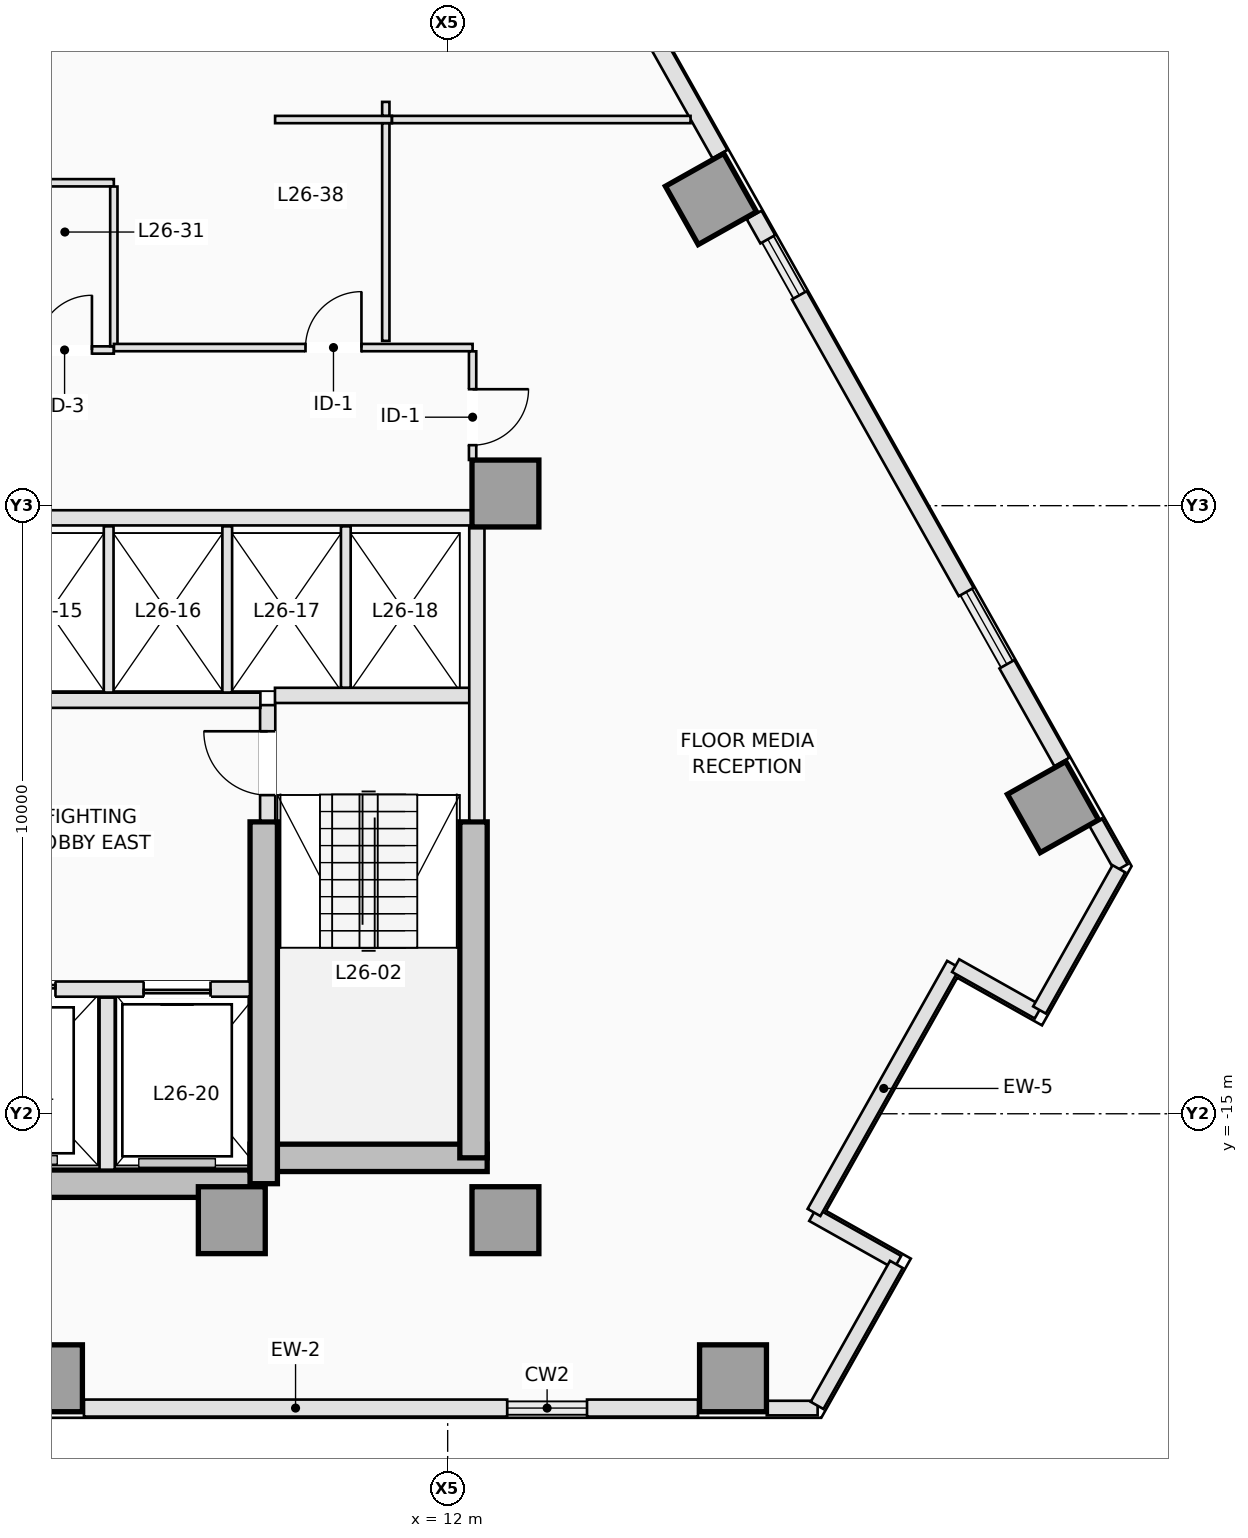
"""IFC4 building model, lengths in metres.
Left out: names, types, materials, properties, quantities, classifications, styles, units other than length and angle.
Written with IfcOpenShell. Run it as: python <this file> out.ifc"""

import sys

from ifc_helpers import new_model, si_unit, direction, frame, frame_2d, origin, origin_2d, place, context, subcontext, project, spatial, rectangle, extrude, element, fill, save


model = new_model("IFC4")
c1 = context("Model", 3, precision=1e-05, world=origin(), true_north=direction((0.0, 1.0)))
c2 = subcontext(c1, "Body", "Model", "MODEL_VIEW")
j1 = project(units=[si_unit("LENGTHUNIT", "METRE"), si_unit("PLANEANGLEUNIT", "RADIAN")], contexts=[c1])
p1 = place(None, origin())
s1 = spatial("IfcSite", under=j1, at=p1, CompositionType="ELEMENT")
p2 = place(p1, origin())
s2 = spatial("IfcBuilding", under=s1, at=p2, CompositionType="ELEMENT")
p3 = place(p2, frame((0.0, 0.0, 98.5)))
s3 = spatial("IfcBuildingStorey", under=s2, at=p3, CompositionType="ELEMENT", Elevation=98.5)
p4 = place(p3, frame((3.75, -16.15, 0.0), z_axis=(0.0, 0.0, 1.0), x_axis=(1.0, 0.0, 0.0)))
e1 = element("IfcWall", 1, at=p4, inside=s3, PredefinedType="SHEAR", context=c2, shape_type="SweptSolid", body=[
    extrude(rectangle(XDim=5.225, YDim=0.45, at=frame_2d((2.613, 0.0))), origin(), (0.0, 0.0, 1.0), 3.5),
])
p5 = place(p3, frame((8.75, -15.725, 0.0), z_axis=(0.0, 0.0, 1.0), x_axis=(1.0, 0.0, 0.0)))
e2 = element("IfcWall", 2, at=p5, inside=s3, PredefinedType="SHEAR", context=c2, shape_type="SweptSolid", body=[
    extrude(rectangle(XDim=3.9, YDim=0.45, at=frame_2d((1.95, 0.0))), origin(), (0.0, 0.0, 1.0), 3.5),
])
p6 = place(p3, frame((12.425, -15.725, 0.0), z_axis=(0.0, 0.0, 1.0), x_axis=(0.0, 1.0, 0.0)))
e3 = element("IfcWall", 3, at=p6, inside=s3, PredefinedType="SHEAR", context=c2, shape_type="SweptSolid", body=[
    extrude(rectangle(XDim=5.525, YDim=0.45, at=frame_2d((2.763, 0.0))), origin(), (0.0, 0.0, 1.0), 3.5),
])
p7 = place(p3, frame((8.975, -16.15, 0.0), z_axis=(0.0, 0.0, 1.0), x_axis=(0.0, 1.0, 0.0)))
e4 = element("IfcWall", 4, at=p7, inside=s3, PredefinedType="SHEAR", context=c2, shape_type="SweptSolid", body=[
    extrude(rectangle(XDim=5.95, YDim=0.45, at=frame_2d((2.975, 0.0))), origin(), (0.0, 0.0, 1.0), 3.5),
])
for number, where, z_axis, x_axis in (
    (5, (8.45, -16.75, 0.0), (0.0, 0.0, 1.0), (1.0, 0.0, 0.0)),
    (6, (12.95, -16.75, 0.0), (0.0, 0.0, 1.0), (1.0, 0.0, 0.0)),
    (7, (12.95, -4.8, 0.0), (0.0, 0.0, 1.0), (1.0, 0.0, 0.0)),
    (8, (5.443, -19.35, 0.0), (0.0, 0.0, 1.0), (0.0, 1.0, 0.0)),
    (9, (16.692, -19.35, 0.0), (0.0, 0.0, 1.0), (0.0, 1.0, 0.0)),
    (10, (21.955, -9.957, 0.0), (0.0, 0.0, 1.0), (0.872, 0.49, 0.0)),
    (11, (16.33, 0.043, 0.0), (0.0, 0.0, 1.0), (0.872, 0.49, 0.0)),
):
    element("IfcColumn", number, at=place(p3, frame(where, z_axis=z_axis, x_axis=x_axis)), inside=s3, PredefinedType="COLUMN", context=c2, shape_type="SweptSolid", body=[
        extrude(rectangle(XDim=1.1, YDim=1.1, at=origin_2d()), origin(), (0.0, 0.0, 1.0), 3.5),
    ])
p8 = place(p3, frame((18.084, -19.84, 0.0), z_axis=(0.0, 0.0, 1.0), x_axis=(-1.0, 0.0, 0.0)))
e12 = element("IfcWall", 12, at=p8, inside=s3, PredefinedType="STANDARD", context=c2, shape_type="SweptSolid", body=[
    extrude(rectangle(XDim=0.836, YDim=0.24, at=frame_2d((0.418, 0.0))), origin(), (0.0, 0.0, 1.0), 3.25),
])
p9 = place(p3, frame((16.117, -19.84, 0.0), z_axis=(0.0, 0.0, 1.0), x_axis=(-1.0, 0.0, 0.0)))
e13 = element("IfcWall", 13, at=p9, inside=s3, PredefinedType="STANDARD", context=c2, shape_type="SweptSolid", body=[
    extrude(rectangle(XDim=1.826, YDim=0.28, at=frame_2d((0.913, 0.0))), origin(), (0.0, 0.0, 1.0), 3.25),
])
p10 = place(p3, frame((12.979, -19.84, 0.0), z_axis=(0.0, 0.0, 1.0), x_axis=(-1.0, 0.0, 0.0)))
e14 = element("IfcWall", 14, at=p10, inside=s3, PredefinedType="STANDARD", context=c2, shape_type="SweptSolid", body=[
    extrude(rectangle(XDim=6.96, YDim=0.28, at=frame_2d((3.48, 0.0))), origin(), (0.0, 0.0, 1.0), 3.25),
])
p11 = place(p3, frame((22.654, -10.2, 0.0), z_axis=(0.0, 0.0, 1.0), x_axis=(0.490355003566, -0.871522788272, 0.0)))
e15 = element("IfcWall", 15, at=p11, inside=s3, PredefinedType="STANDARD", context=c2, shape_type="SweptSolid", body=[
    extrude(rectangle(XDim=0.865, YDim=0.24, at=frame_2d((0.433, 0.0))), origin(), (0.0, 0.0, 1.0), 3.25),
])
p12 = place(p3, frame((17.039, -0.218, 0.0), z_axis=(0.0, 0.0, 1.0), x_axis=(0.490009165718, -0.871717280724, 0.0)))
e16 = element("IfcWall", 16, at=p12, inside=s3, PredefinedType="STANDARD", context=c2, shape_type="SweptSolid", body=[
    extrude(rectangle(XDim=0.46, YDim=0.28, at=frame_2d((0.23, 0.0))), origin(), (0.0, 0.0, 1.0), 3.25),
])
p13 = place(p3, frame((17.783, -1.541, 0.0), z_axis=(0.0, 0.0, 1.0), x_axis=(0.490265381388, -0.871573207374, 0.0)))
e17 = element("IfcWall", 17, at=p13, inside=s3, PredefinedType="STANDARD", context=c2, shape_type="SweptSolid", body=[
    extrude(rectangle(XDim=5.597, YDim=0.28, at=frame_2d((2.799, 0.0))), origin(), (0.0, 0.0, 1.0), 3.25),
])
p14 = place(p3, frame((21.196, -7.608, 0.0), z_axis=(0.0, 0.0, 1.0), x_axis=(0.490280102884, -0.871564926277, 0.0)))
e18 = element("IfcWall", 18, at=p14, inside=s3, PredefinedType="STANDARD", context=c2, shape_type="SweptSolid", body=[
    extrude(rectangle(XDim=1.844, YDim=0.28, at=frame_2d((0.922, 0.0))), origin(), (0.0, 0.0, 1.0), 3.25),
])
p15 = place(p3, frame((14.37, 4.527, 0.0), z_axis=(0.0, 0.0, 1.0), x_axis=(0.490293592365, -0.871557337922, 0.0)))
e19 = element("IfcWall", 19, at=p15, inside=s3, PredefinedType="STANDARD", context=c2, shape_type="SweptSolid", body=[
    extrude(rectangle(XDim=4.299, YDim=0.28, at=frame_2d((2.15, 0.0))), origin(), (0.0, 0.0, 1.0), 3.25),
])
p16 = place(p3, frame((19.399, -17.442, 0.0), z_axis=(0.0, 0.0, 1.0), x_axis=(-0.871575537125, 0.490261239633, 0.0)))
e20 = element("IfcWall", 20, at=p16, inside=s3, PredefinedType="STANDARD", context=c2, shape_type="SweptSolid", body=[
    extrude(rectangle(XDim=1.6, YDim=0.24, at=frame_2d((0.8, 0.0))), origin(), (0.0, 0.0, 1.0), 3.25),
])
p17 = place(p3, frame((18.024, -16.623, 0.0), z_axis=(0.0, 0.0, 1.0), x_axis=(0.490273623647, 0.871568571001, 0.0)))
e21 = element("IfcWall", 21, at=p17, inside=s3, PredefinedType="STANDARD", context=c2, shape_type="SweptSolid", body=[
    extrude(rectangle(XDim=4.68, YDim=0.24, at=frame_2d((2.34, 0.0))), origin(), (0.0, 0.0, 1.0), 2.722),
])
p18 = place(p3, frame((20.354, -12.564, 0.0), z_axis=(0.0, 0.0, 1.0), x_axis=(0.871546278971, -0.490313250496, 0.0)))
e22 = element("IfcWall", 22, at=p18, inside=s3, PredefinedType="STANDARD", context=c2, shape_type="SweptSolid", body=[
    extrude(rectangle(XDim=1.56, YDim=0.24, at=frame_2d((0.78, 0.0))), origin(), (0.0, 0.0, 1.0), 3.25),
])
p19 = place(p3, frame((21.733, -13.294, 0.0), z_axis=(0.0, 0.0, 1.0), x_axis=(0.490265590412, 0.871573089797, 0.0)))
e23 = element("IfcWall", 23, at=p19, inside=s3, PredefinedType="STANDARD", context=c2, shape_type="SweptSolid", body=[
    extrude(rectangle(XDim=2.664, YDim=0.24, at=frame_2d((1.332, 0.0))), origin(), (0.0, 0.0, 1.0), 3.25),
])
p20 = place(p3, frame((18.075, -19.796, 0.0), z_axis=(0.0, 0.0, 1.0), x_axis=(0.490248170584, 0.871582888335, 0.0)))
e24 = element("IfcWall", 24, at=p20, inside=s3, PredefinedType="STANDARD", context=c2, shape_type="SweptSolid", body=[
    extrude(rectangle(XDim=2.661, YDim=0.24, at=frame_2d((1.331, 0.0))), origin(), (0.0, 0.0, 1.0), 3.25),
])
p21 = place(p3, frame((9.04, -10.18, 0.0), z_axis=(0.0, 0.0, 1.0), x_axis=(0.0, 1.0, 0.0)))
e25 = element("IfcWall", 25, at=p21, inside=s3, PredefinedType="PARTITIONING", context=c2, shape_type="SweptSolid", body=[
    extrude(rectangle(XDim=1.9, YDim=0.25, at=frame_2d((0.95, 0.0))), origin(), (0.0, 0.0, 1.0), 3.25),
])
p22 = place(p21, frame((0.42, 0.0, 0.0)))
e26 = element("IfcOpeningElement", 26, at=p22, cuts=e25, PredefinedType="OPENING", context=c2, shape_type="SweptSolid", body=[
    extrude(rectangle(XDim=1.05, YDim=2.15, at=frame_2d((0.525, 1.075))), frame((0.0, 0.135, 0.0), z_axis=(0.0, -1.0, 0.0), x_axis=(1.0, 0.0, 0.0)), (0.0, 0.0, 1.0), 0.27),
])
p23 = place(p3, frame((9.16, -8.12, 0.0), z_axis=(0.0, 0.0, 1.0), x_axis=(1.0, 0.0, 0.0)))
e27 = element("IfcWall", 27, at=p23, inside=s3, PredefinedType="PARTITIONING", context=c2, shape_type="SweptSolid", body=[
    extrude(rectangle(XDim=3.22, YDim=0.25, at=frame_2d((1.61, 0.0))), origin(), (0.0, 0.0, 1.0), 3.25),
])
p24 = place(p3, frame((12.48, -10.18, 0.0), z_axis=(0.0, 0.0, 1.0), x_axis=(0.0, 1.0, 0.0)))
e28 = element("IfcWall", 28, at=p24, inside=s3, PredefinedType="PARTITIONING", context=c2, shape_type="SweptSolid", body=[
    extrude(rectangle(XDim=4.828, YDim=0.25, at=frame_2d((2.414, 0.0))), origin(), (0.0, 0.0, 1.0), 3.25),
])
p25 = place(p3, frame((3.68, -12.95, 0.0), z_axis=(0.0, 0.0, 1.0), x_axis=(1.0, 0.0, 0.0)))
e29 = element("IfcWall", 29, at=p25, inside=s3, PredefinedType="PARTITIONING", context=c2, shape_type="SweptSolid", body=[
    extrude(rectangle(XDim=5.068, YDim=0.25, at=frame_2d((2.534, 0.0))), origin(), (0.0, 0.0, 1.0), 3.25),
])
p26 = place(p25, frame((3.32, 0.0, 0.0)))
e30 = element("IfcOpeningElement", 30, at=p26, cuts=e29, PredefinedType="OPENING", context=c2, shape_type="SweptSolid", body=[
    extrude(rectangle(XDim=1.1, YDim=2.15, at=frame_2d((0.55, 1.075))), frame((0.0, 0.135, 0.0), z_axis=(0.0, -1.0, 0.0), x_axis=(1.0, 0.0, 0.0)), (0.0, 0.0, 1.0), 0.27),
])
p27 = place(p25, frame((0.67, 0.0, 0.0)))
e31 = element("IfcOpeningElement", 31, at=p27, cuts=e29, PredefinedType="OPENING", context=c2, shape_type="SweptSolid", body=[
    extrude(rectangle(XDim=1.2, YDim=2.15, at=frame_2d((0.6, 1.075))), frame((0.0, 0.135, 0.0), z_axis=(0.0, -1.0, 0.0), x_axis=(1.0, 0.0, 0.0)), (0.0, 0.0, 1.0), 0.27),
])
p28 = place(p3, frame((6.4, -15.92, 0.0), z_axis=(0.0, 0.0, 1.0), x_axis=(0.0, 1.0, 0.0)))
e32 = element("IfcWall", 32, at=p28, inside=s3, PredefinedType="PARTITIONING", context=c2, shape_type="SweptSolid", body=[
    extrude(rectangle(XDim=2.83, YDim=0.25, at=frame_2d((1.415, 0.0))), origin(), (0.0, 0.0, 1.0), 3.25),
])
p29 = place(p3, frame((3.68, -8.2, 0.0), z_axis=(0.0, 0.0, 1.0), x_axis=(1.0, 0.0, 0.0)))
e33 = element("IfcWall", 33, at=p29, inside=s3, PredefinedType="PARTITIONING", context=c2, shape_type="SweptSolid", body=[
    extrude(rectangle(XDim=5.24, YDim=0.25, at=frame_2d((2.62, 0.0))), origin(), (0.0, 0.0, 1.0), 3.25),
])
p30 = place(p3, frame((4.302, -5.2, 0.0), z_axis=(0.0, 0.0, 1.0), x_axis=(1.0, 0.0, 0.0)))
e34 = element("IfcWall", 34, at=p30, inside=s3, PredefinedType="PARTITIONING", context=c2, shape_type="SweptSolid", body=[
    extrude(rectangle(XDim=8.096, YDim=0.25, at=frame_2d((4.048, 0.0))), origin(), (0.0, 0.0, 1.0), 3.25),
])
for number, where, z_axis, x_axis in (
    (35, (6.425, -8.073, 0.0), (0.0, 0.0, 1.0), (0.0, 1.0, 0.0)),
    (36, (8.375, -8.073, 0.0), (0.0, 0.0, 1.0), (0.0, 1.0, 0.0)),
):
    element("IfcWall", number, at=place(p3, frame(where, z_axis=z_axis, x_axis=x_axis)), inside=s3, PredefinedType="PARTITIONING", context=c2, shape_type="SweptSolid", body=[
        extrude(rectangle(XDim=2.733, YDim=0.16, at=frame_2d((1.366, 0.0))), origin(), (0.0, 0.0, 1.0), 3.25),
    ])
p31 = place(p3, frame((10.325, -7.993, 0.0), z_axis=(0.0, 0.0, 1.0), x_axis=(0.0, 1.0, 0.0)))
e37 = element("IfcWall", 37, at=p31, inside=s3, PredefinedType="PARTITIONING", context=c2, shape_type="SweptSolid", body=[
    extrude(rectangle(XDim=2.653, YDim=0.16, at=frame_2d((1.326, 0.0))), origin(), (0.0, 0.0, 1.0), 3.25),
])
p32 = place(p3, frame((3.29, -2.44, 0.0), z_axis=(0.0, 0.0, 1.0), x_axis=(1.0, 0.0, 0.0)))
e38 = element("IfcWall", 38, at=p32, inside=s3, PredefinedType="PARTITIONING", context=c2, shape_type="SweptSolid", body=[
    extrude(rectangle(XDim=3.22, YDim=0.12, at=frame_2d((1.61, 0.0))), origin(), (0.0, 0.0, 1.0), 3.25),
])
p33 = place(p32, frame((0.36, 0.0, 0.0)))
e39 = element("IfcOpeningElement", 39, at=p33, cuts=e38, PredefinedType="OPENING", context=c2, shape_type="SweptSolid", body=[
    extrude(rectangle(XDim=0.9, YDim=2.12, at=frame_2d((0.45, 1.06))), frame((0.0, 0.07, 0.0), z_axis=(0.0, -1.0, 0.0), x_axis=(1.0, 0.0, 0.0)), (0.0, 0.0, 1.0), 0.14),
])
p34 = place(p32, frame((1.96, 0.0, 0.0)))
e40 = element("IfcOpeningElement", 40, at=p34, cuts=e38, PredefinedType="OPENING", context=c2, shape_type="SweptSolid", body=[
    extrude(rectangle(XDim=0.9, YDim=2.12, at=frame_2d((0.45, 1.06))), frame((0.0, 0.07, 0.0), z_axis=(0.0, -1.0, 0.0), x_axis=(1.0, 0.0, 0.0)), (0.0, 0.0, 1.0), 0.14),
])
p35 = place(p3, frame((3.29, 0.31, 0.0), z_axis=(0.0, 0.0, 1.0), x_axis=(1.0, 0.0, 0.0)))
e41 = element("IfcWall", 41, at=p35, inside=s3, PredefinedType="PARTITIONING", context=c2, shape_type="SweptSolid", body=[
    extrude(rectangle(XDim=3.22, YDim=0.12, at=frame_2d((1.61, 0.0))), origin(), (0.0, 0.0, 1.0), 2.891),
])
p36 = place(p3, frame((6.51, -2.378, 0.0), z_axis=(0.0, 0.0, 1.0), x_axis=(0.0, 1.0, 0.0)))
e42 = element("IfcWall", 42, at=p36, inside=s3, PredefinedType="PARTITIONING", context=c2, shape_type="SweptSolid", body=[
    extrude(rectangle(XDim=2.626, YDim=0.12, at=frame_2d((1.313, 0.0))), origin(), (0.0, 0.0, 1.0), 3.25),
])
p37 = place(p3, frame((6.512, -2.4, 0.0), z_axis=(0.0, 0.0, 1.0), x_axis=(1.0, 0.0, 0.0)))
e43 = element("IfcWall", 43, at=p37, inside=s3, PredefinedType="PARTITIONING", context=c2, shape_type="SweptSolid", body=[
    extrude(rectangle(XDim=5.898, YDim=0.12, at=frame_2d((2.949, 0.0))), origin(), (0.0, 0.0, 1.0), 3.25),
])
p38 = place(p37, frame((3.15, 0.0, 0.0)))
e44 = element("IfcOpeningElement", 44, at=p38, cuts=e43, PredefinedType="OPENING", context=c2, shape_type="SweptSolid", body=[
    extrude(rectangle(XDim=0.92, YDim=2.12, at=frame_2d((0.46, 1.06))), frame((0.0, 0.07, 0.0), z_axis=(0.0, -1.0, 0.0), x_axis=(1.0, 0.0, 0.0)), (0.0, 0.0, 1.0), 0.14),
])
p39 = place(p3, frame((12.41, -2.462, 0.0), z_axis=(0.0, 0.0, 1.0), x_axis=(0.0, -1.0, 0.0)))
e45 = element("IfcWall", 45, at=p39, inside=s3, PredefinedType="PARTITIONING", context=c2, shape_type="SweptSolid", body=[
    extrude(rectangle(XDim=1.786, YDim=0.12, at=frame_2d((0.893, 0.0))), origin(), (0.0, 0.0, 1.0), 3.25),
])
p40 = place(p39, frame((0.623, 0.0, 0.0)))
e46 = element("IfcOpeningElement", 46, at=p40, cuts=e45, PredefinedType="OPENING", context=c2, shape_type="SweptSolid", body=[
    extrude(rectangle(XDim=0.92, YDim=2.12, at=frame_2d((0.46, 1.06))), frame((0.0, 0.07, 0.0), z_axis=(0.0, -1.0, 0.0), x_axis=(1.0, 0.0, 0.0)), (0.0, 0.0, 1.0), 0.14),
])
p41 = place(p3, frame((11.083, 1.35, 0.0), z_axis=(0.0, 0.0, 1.0), x_axis=(-1.0, 0.0, 0.0)))
e47 = element("IfcWall", 47, at=p41, inside=s3, PredefinedType="PARTITIONING", context=c2, shape_type="SweptSolid", body=[
    extrude(rectangle(XDim=1.92, YDim=0.12, at=frame_2d((0.96, 0.0))), origin(), (0.0, 0.0, 1.0), 3.25),
])
p42 = place(p3, frame((15.994, 1.35, 0.0), z_axis=(0.0, 0.0, 1.0), x_axis=(-1.0, 0.0, 0.0)))
e48 = element("IfcWall", 48, at=p42, inside=s3, PredefinedType="PARTITIONING", context=c2, shape_type="SweptSolid", body=[
    extrude(rectangle(XDim=4.91, YDim=0.12, at=frame_2d((2.455, 0.0))), origin(), (0.0, 0.0, 1.0), 3.25),
])
p43 = place(p3, frame((10.982, 1.64, 0.0), z_axis=(0.0, 0.0, 1.0), x_axis=(0.0, -1.0, 0.0)))
e49 = element("IfcWall", 49, at=p43, inside=s3, PredefinedType="PARTITIONING", context=c2, shape_type="SweptSolid", body=[
    extrude(rectangle(XDim=0.228, YDim=0.12, at=frame_2d((0.114, 0.0))), origin(), (0.0, 0.0, 1.0), 3.25),
])
p44 = place(p3, frame((10.982, 1.288, 0.0), z_axis=(0.0, 0.0, 1.0), x_axis=(0.0, -1.0, 0.0)))
e50 = element("IfcWall", 50, at=p44, inside=s3, PredefinedType="PARTITIONING", context=c2, shape_type="SweptSolid", body=[
    extrude(rectangle(XDim=3.578, YDim=0.12, at=frame_2d((1.789, 0.0))), origin(), (0.0, 0.0, 1.0), 3.25),
])
p45 = place(p26, origin())
e51 = element("IfcDoor", 51, at=p45, inside=s3, OperationType="SLIDING_TO_RIGHT", PredefinedType="DOOR", context=c2, shape_type="SweptSolid", body=[
    extrude(rectangle(XDim=1.1, YDim=2.15, at=frame_2d((0.55, 1.075))), frame((0.0, 0.025, 0.0), z_axis=(0.0, -1.0, 0.0), x_axis=(1.0, 0.0, 0.0)), (0.0, 0.0, 1.0), 0.05),
])
fill(e30, e51)
p46 = place(p27, origin())
e52 = element("IfcDoor", 52, at=p46, inside=s3, OperationType="SLIDING_TO_LEFT", PredefinedType="DOOR", context=c2, shape_type="SweptSolid", body=[
    extrude(rectangle(XDim=1.2, YDim=2.15, at=frame_2d((0.6, 1.075))), frame((0.0, 0.025, 0.0), z_axis=(0.0, -1.0, 0.0), x_axis=(1.0, 0.0, 0.0)), (0.0, 0.0, 1.0), 0.05),
])
fill(e31, e52)
p47 = place(p22, origin())
e53 = element("IfcDoor", 53, at=p47, inside=s3, OperationType="SINGLE_SWING_RIGHT", PredefinedType="DOOR", context=c2, shape_type="SweptSolid", body=[
    extrude(rectangle(XDim=1.05, YDim=2.15, at=frame_2d((0.525, 1.075))), frame((0.0, 0.025, 0.0), z_axis=(0.0, -1.0, 0.0), x_axis=(1.0, 0.0, 0.0)), (0.0, 0.0, 1.0), 0.05),
])
fill(e26, e53)
p48 = place(p34, origin())
e54 = element("IfcDoor", 54, at=p48, inside=s3, OperationType="SINGLE_SWING_RIGHT", PredefinedType="DOOR", context=c2, shape_type="SweptSolid", body=[
    extrude(rectangle(XDim=0.9, YDim=2.12, at=frame_2d((0.45, 1.06))), frame((0.0, 0.025, 0.0), z_axis=(0.0, -1.0, 0.0), x_axis=(1.0, 0.0, 0.0)), (0.0, 0.0, 1.0), 0.05),
])
fill(e40, e54)
p49 = place(p38, origin())
e55 = element("IfcDoor", 55, at=p49, inside=s3, OperationType="SINGLE_SWING_RIGHT", PredefinedType="DOOR", context=c2, shape_type="SweptSolid", body=[
    extrude(rectangle(XDim=0.92, YDim=2.12, at=frame_2d((0.46, 1.06))), frame((0.0, 0.025, 0.0), z_axis=(0.0, -1.0, 0.0), x_axis=(1.0, 0.0, 0.0)), (0.0, 0.0, 1.0), 0.05),
])
fill(e44, e55)
p50 = place(p40, origin())
e56 = element("IfcDoor", 56, at=p50, inside=s3, OperationType="SINGLE_SWING_LEFT", PredefinedType="DOOR", context=c2, shape_type="SweptSolid", body=[
    extrude(rectangle(XDim=0.92, YDim=2.12, at=frame_2d((0.46, 1.06))), frame((0.0, 0.025, 0.0), z_axis=(0.0, -1.0, 0.0), x_axis=(1.0, 0.0, 0.0)), (0.0, 0.0, 1.0), 0.05),
])
fill(e46, e56)
save(model, sys.argv[1])
